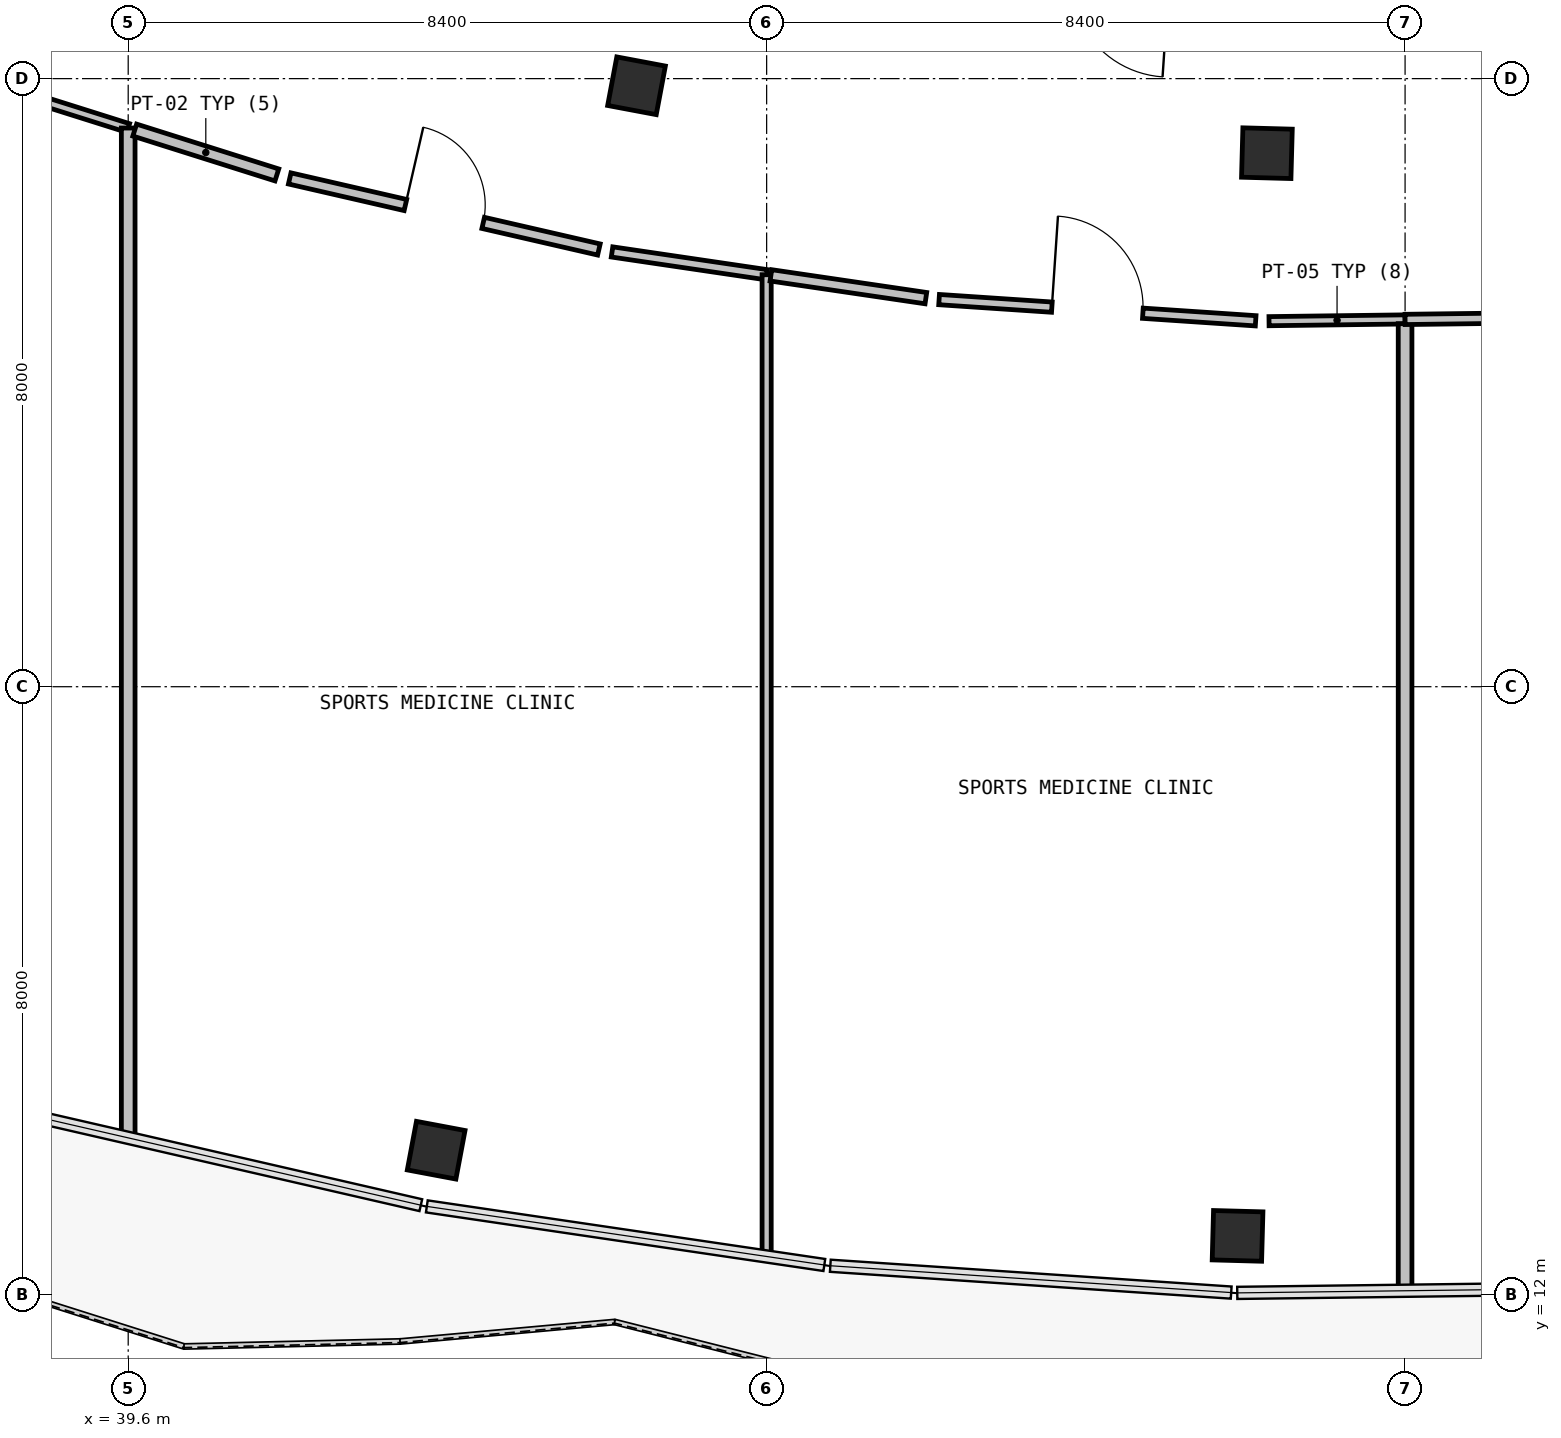
"""IFC4 building model, lengths in metres.
Left out: names, types, materials, properties, quantities, classifications, styles, units other than length and angle.
Written with IfcOpenShell. Run it as: python <this file> out.ifc"""

import sys

from ifc_helpers import new_model, si_unit, direction, frame, frame_2d, origin, origin_2d, place, context, subcontext, project, spatial, rectangle, extrude, element, fill, save


model = new_model("IFC4")
c1 = context("Model", 3, precision=1e-05, world=origin(), true_north=direction((0.0, 1.0)))
c2 = subcontext(c1, "Body", "Model", "MODEL_VIEW")
j1 = project(units=[si_unit("LENGTHUNIT", "METRE"), si_unit("PLANEANGLEUNIT", "RADIAN")], contexts=[c1])
p1 = place(None, origin())
s1 = spatial("IfcSite", under=j1, at=p1, CompositionType="ELEMENT")
p2 = place(p1, origin())
s2 = spatial("IfcBuilding", under=s1, at=p2, CompositionType="ELEMENT")
p3 = place(p2, frame((0.0, 0.0, 10.2)))
s3 = spatial("IfcBuildingStorey", under=s2, at=p3, CompositionType="ELEMENT", Elevation=10.2)
for number, where, z_axis, x_axis in (
    (1, (46.288, 27.906, 0.0), (0.0, 0.0, 1.0), (0.185, 0.983, 0.0)),
    (2, (43.652, 13.902, 0.0), (0.0, 0.0, 1.0), (0.185, 0.983, 0.0)),
    (3, (54.582, 27.019, 0.0), (0.0, 0.0, 1.0), (0.027, 1.0, 0.0)),
    (4, (54.196, 12.775, 0.0), (0.0, 0.0, 1.0), (0.027, 1.0, 0.0)),
):
    element("IfcColumn", number, at=place(p3, frame(where, z_axis=z_axis, x_axis=x_axis)), inside=s3, PredefinedType="COLUMN", context=c2, shape_type="SweptSolid", body=[
        extrude(rectangle(XDim=0.65, YDim=0.65, at=origin_2d()), origin(), (0.0, 0.0, 1.0), 4.8),
    ])
p4 = place(p3, frame((37.575, 27.988, 0.0), z_axis=(0.0, 0.0, 1.0), x_axis=(0.953796174372, -0.300454418762, 0.0)))
e5 = element("IfcWall", 5, at=p4, inside=s3, PredefinedType="PARTITIONING", context=c2, shape_type="SweptSolid", body=[
    extrude(rectangle(XDim=2.123, YDim=0.12, at=frame_2d((1.062, 0.0))), origin(), (0.0, 0.0, 1.0), 4.46),
])
p5 = place(p3, frame((39.6, 27.35, 0.0), z_axis=(0.0, 0.0, 1.0), x_axis=(0.0, -1.0, 0.0)))
e6 = element("IfcWall", 6, at=p5, inside=s3, PredefinedType="PARTITIONING", context=c2, shape_type="SweptSolid", body=[
    extrude(rectangle(XDim=13.274, YDim=0.18, at=frame_2d((6.637, 0.0))), origin(), (0.0, 0.0, 1.0), 4.46),
])
p6 = place(p3, frame((39.686, 27.323, 0.0), z_axis=(0.0, 0.0, 1.0), x_axis=(0.953640983057, -0.300946632204, 0.0)))
e7 = element("IfcWall", 7, at=p6, inside=s3, PredefinedType="PARTITIONING", context=c2, shape_type="SweptSolid", body=[
    extrude(rectangle(XDim=1.961, YDim=0.165, at=frame_2d((0.98, 0.0))), origin(), (0.0, 0.0, 1.0), 4.46),
])
p7 = place(p3, frame((41.725, 26.687, 0.0), z_axis=(0.0, 0.0, 1.0), x_axis=(0.974584054813, -0.224022141996, 0.0)))
e8 = element("IfcWall", 8, at=p7, inside=s3, PredefinedType="PARTITIONING", context=c2, shape_type="SweptSolid", body=[
    extrude(rectangle(XDim=4.174, YDim=0.15, at=frame_2d((2.087, 0.0))), origin(), (0.0, 0.0, 1.0), 4.46),
])
p8 = place(p7, frame((1.562, 0.0, 0.0)))
e9 = element("IfcOpeningElement", 9, at=p8, cuts=e8, PredefinedType="OPENING", context=c2, shape_type="SweptSolid", body=[
    extrude(rectangle(XDim=1.05, YDim=2.15, at=frame_2d((0.525, 1.075))), frame((0.0, 0.085, 0.0), z_axis=(0.0, -1.0, 0.0), x_axis=(1.0, 0.0, 0.0)), (0.0, 0.0, 1.0), 0.17),
])
p9 = place(p3, frame((45.966, 25.72, 0.0), z_axis=(0.0, 0.0, 1.0), x_axis=(0.989293174374, -0.145941821067, 0.0)))
e10 = element("IfcWall", 10, at=p9, inside=s3, PredefinedType="PARTITIONING", context=c2, shape_type="SweptSolid", body=[
    extrude(rectangle(XDim=2.056, YDim=0.135, at=frame_2d((1.028, 0.0))), origin(), (0.0, 0.0, 1.0), 4.46),
])
p10 = place(p3, frame((48.0, 25.42, 0.0), z_axis=(0.0, 0.0, 1.0), x_axis=(0.0, -1.0, 0.0)))
e11 = element("IfcWall", 11, at=p10, inside=s3, PredefinedType="PARTITIONING", context=c2, shape_type="SweptSolid", body=[
    extrude(rectangle(XDim=12.905, YDim=0.12, at=frame_2d((6.453, 0.0))), origin(), (0.0, 0.0, 1.0), 4.46),
])
p11 = place(p3, frame((48.056, 25.412, 0.0), z_axis=(0.0, 0.0, 1.0), x_axis=(0.989346092184, -0.145582656525, 0.0)))
e12 = element("IfcWall", 12, at=p11, inside=s3, PredefinedType="PARTITIONING", context=c2, shape_type="SweptSolid", body=[
    extrude(rectangle(XDim=2.061, YDim=0.15, at=frame_2d((1.031, 0.0))), origin(), (0.0, 0.0, 1.0), 4.46),
])
p12 = place(p3, frame((50.269, 25.093, 0.0), z_axis=(0.0, 0.0, 1.0), x_axis=(0.997763106532, -0.066848958427, 0.0)))
e13 = element("IfcWall", 13, at=p12, inside=s3, PredefinedType="PARTITIONING", context=c2, shape_type="SweptSolid", body=[
    extrude(rectangle(XDim=4.174, YDim=0.135, at=frame_2d((2.087, 0.0))), origin(), (0.0, 0.0, 1.0), 4.46),
])
p13 = place(p12, frame((1.487, 0.0, 0.0)))
e14 = element("IfcOpeningElement", 14, at=p13, cuts=e13, PredefinedType="OPENING", context=c2, shape_type="SweptSolid", body=[
    extrude(rectangle(XDim=1.2, YDim=2.15, at=frame_2d((0.6, 1.075))), frame((0.0, 0.077, 0.0), z_axis=(0.0, -1.0, 0.0), x_axis=(1.0, 0.0, 0.0)), (0.0, 0.0, 1.0), 0.155),
])
p14 = place(p3, frame((54.61, 24.809, 0.0), z_axis=(0.0, 0.0, 1.0), x_axis=(0.999917804939, 0.012821207702, 0.0)))
e15 = element("IfcWall", 15, at=p14, inside=s3, PredefinedType="PARTITIONING", context=c2, shape_type="SweptSolid", body=[
    extrude(rectangle(XDim=1.79, YDim=0.12, at=frame_2d((0.895, 0.0))), origin(), (0.0, 0.0, 1.0), 4.46),
])
p15 = place(p3, frame((56.4, 24.776, 0.0), z_axis=(0.0, 0.0, 1.0), x_axis=(0.0, -1.0, 0.0)))
e16 = element("IfcWall", 16, at=p15, inside=s3, PredefinedType="PARTITIONING", context=c2, shape_type="SweptSolid", body=[
    extrude(rectangle(XDim=12.712, YDim=0.18, at=frame_2d((6.356, 0.0))), origin(), (0.0, 0.0, 1.0), 4.46),
])
p16 = place(p3, frame((56.4, 24.832, 0.0), z_axis=(0.0, 0.0, 1.0), x_axis=(0.999920614738, 0.012600167566, 0.0)))
e17 = element("IfcWall", 17, at=p16, inside=s3, PredefinedType="PARTITIONING", context=c2, shape_type="SweptSolid", body=[
    extrude(rectangle(XDim=2.383, YDim=0.135, at=frame_2d((1.192, 0.0))), origin(), (0.0, 0.0, 1.0), 4.46),
])
p17 = place(p8, origin())
e18 = element("IfcDoor", 18, at=p17, inside=s3, OperationType="SINGLE_SWING_LEFT", PredefinedType="DOOR", context=c2, shape_type="SweptSolid", body=[
    extrude(rectangle(XDim=1.05, YDim=2.15, at=frame_2d((0.525, 1.075))), frame((0.0, 0.025, 0.0), z_axis=(0.0, -1.0, 0.0), x_axis=(1.0, 0.0, 0.0)), (0.0, 0.0, 1.0), 0.05),
])
fill(e9, e18)
p18 = place(p13, origin())
e19 = element("IfcDoor", 19, at=p18, inside=s3, OperationType="SINGLE_SWING_LEFT", PredefinedType="DOOR", context=c2, shape_type="SweptSolid", body=[
    extrude(rectangle(XDim=1.2, YDim=2.15, at=frame_2d((0.6, 1.075))), frame((0.0, 0.025, 0.0), z_axis=(0.0, -1.0, 0.0), x_axis=(1.0, 0.0, 0.0)), (0.0, 0.0, 1.0), 0.05),
])
fill(e14, e19)
save(model, sys.argv[1])
